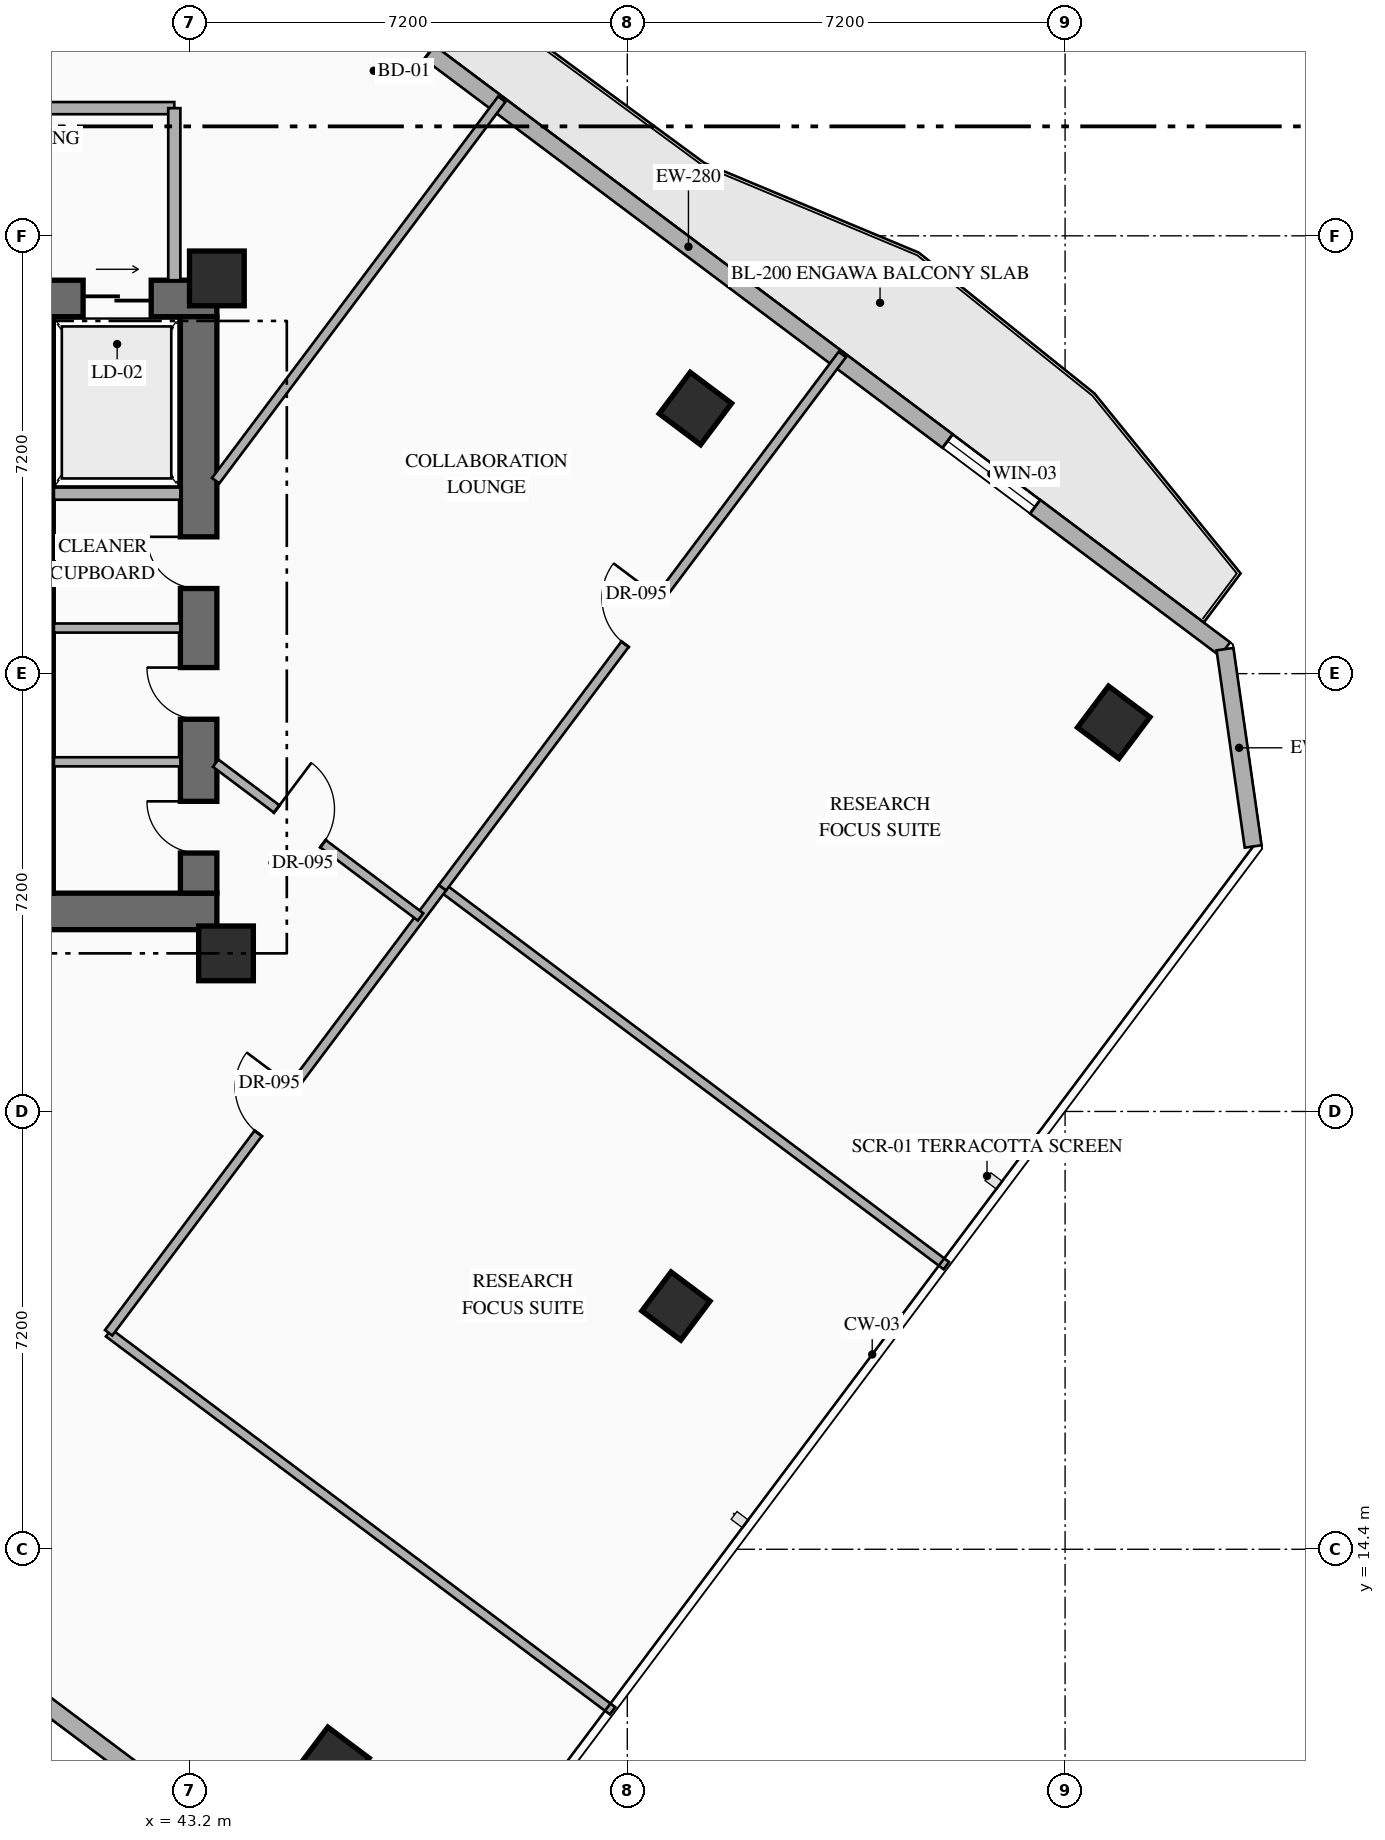
"""IFC4 building model, lengths in metres.
Left out: names, types, materials, properties, quantities, classifications, styles, units other than length and angle.
Written with IfcOpenShell. Run it as: python <this file> out.ifc"""

import sys

from ifc_helpers import new_model, si_unit, direction, frame, frame_2d, origin, origin_2d, place, context, subcontext, project, spatial, rectangle, hollow_rectangle, extrude, element, fill, save


model = new_model("IFC4")
c1 = context("Model", 3, precision=1e-05, world=origin(), true_north=direction((0.0, 1.0)))
c2 = subcontext(c1, "Body", "Model", "MODEL_VIEW")
j1 = project(units=[si_unit("LENGTHUNIT", "METRE"), si_unit("PLANEANGLEUNIT", "RADIAN")], contexts=[c1])
p1 = place(None, origin())
s1 = spatial("IfcSite", under=j1, at=p1, CompositionType="ELEMENT")
p2 = place(p1, origin())
s2 = spatial("IfcBuilding", under=s1, at=p2, CompositionType="ELEMENT")
p3 = place(p2, frame((0.0, 0.0, 138.45)))
s3 = spatial("IfcBuildingStorey", under=s2, at=p3, CompositionType="ELEMENT", Elevation=138.45)
p4 = place(p3, frame((35.89, 24.89, 0.0), z_axis=(0.0, 0.0, 1.0), x_axis=(1.0, 0.0, 0.0)))
e1 = element("IfcWall", 1, at=p4, inside=s3, PredefinedType="SHEAR", context=c2, shape_type="SweptSolid", body=[
    extrude(rectangle(XDim=7.76, YDim=0.6, at=frame_2d((3.88, 0.0))), origin(), (0.0, 0.0, 1.0), 3.6),
])
p5 = place(p3, frame((35.89, 34.97, 0.0), z_axis=(0.0, 0.0, 1.0), x_axis=(1.0, 0.0, 0.0)))
e2 = element("IfcWall", 2, at=p5, inside=s3, PredefinedType="SHEAR", context=c2, shape_type="SweptSolid", body=[
    extrude(rectangle(XDim=7.76, YDim=0.6, at=frame_2d((3.88, 0.0))), origin(), (0.0, 0.0, 1.0), 3.6),
])
p6 = place(p5, frame((2.66, 0.0, 0.0)))
e3 = element("IfcOpeningElement", 3, at=p6, cuts=e2, PredefinedType="OPENING", context=c2, shape_type="SweptSolid", body=[
    extrude(rectangle(XDim=1.1, YDim=2.2, at=frame_2d((0.55, 1.1))), frame((0.0, 0.31, 0.0), z_axis=(0.0, -1.0, 0.0), x_axis=(1.0, 0.0, 0.0)), (0.0, 0.0, 1.0), 0.62),
])
p7 = place(p5, frame((5.56, 0.0, 0.0)))
e4 = element("IfcOpeningElement", 4, at=p7, cuts=e2, PredefinedType="OPENING", context=c2, shape_type="SweptSolid", body=[
    extrude(rectangle(XDim=1.12, YDim=2.15, at=frame_2d((0.56, 1.075))), frame((0.0, 0.31, 0.0), z_axis=(0.0, -1.0, 0.0), x_axis=(1.0, 0.0, 0.0)), (0.0, 0.0, 1.0), 0.62),
])
p8 = place(p3, frame((43.35, 25.19, 0.0), z_axis=(0.0, 0.0, 1.0), x_axis=(0.0, 1.0, 0.0)))
e5 = element("IfcWall", 5, at=p8, inside=s3, PredefinedType="SHEAR", context=c2, shape_type="SweptSolid", body=[
    extrude(rectangle(XDim=9.48, YDim=0.6, at=frame_2d((4.74, 0.0))), origin(), (0.0, 0.0, 1.0), 3.6),
])
p9 = place(p8, frame((0.66, 0.0, 0.0)))
e6 = element("IfcOpeningElement", 6, at=p9, cuts=e5, PredefinedType="OPENING", context=c2, shape_type="SweptSolid", body=[
    extrude(rectangle(XDim=0.85, YDim=2.08, at=frame_2d((0.425, 1.04))), frame((0.0, 0.31, 0.0), z_axis=(0.0, -1.0, 0.0), x_axis=(1.0, 0.0, 0.0)), (0.0, 0.0, 1.0), 0.62),
])
p10 = place(p8, frame((2.86, 0.0, 0.0)))
e7 = element("IfcOpeningElement", 7, at=p10, cuts=e5, PredefinedType="OPENING", context=c2, shape_type="SweptSolid", body=[
    extrude(rectangle(XDim=0.85, YDim=2.08, at=frame_2d((0.425, 1.04))), frame((0.0, 0.31, 0.0), z_axis=(0.0, -1.0, 0.0), x_axis=(1.0, 0.0, 0.0)), (0.0, 0.0, 1.0), 0.62),
])
p11 = place(p8, frame((5.01, 0.0, 0.0)))
e8 = element("IfcOpeningElement", 8, at=p11, cuts=e5, PredefinedType="OPENING", context=c2, shape_type="SweptSolid", body=[
    extrude(rectangle(XDim=0.85, YDim=2.08, at=frame_2d((0.425, 1.04))), frame((0.0, 0.31, 0.0), z_axis=(0.0, -1.0, 0.0), x_axis=(1.0, 0.0, 0.0)), (0.0, 0.0, 1.0), 0.62),
])
p12 = place(p3, frame((40.81, 25.19, 0.0), z_axis=(0.0, 0.0, 1.0), x_axis=(0.0, 1.0, 0.0)))
e9 = element("IfcWall", 9, at=p12, inside=s3, PredefinedType="SHEAR", context=c2, shape_type="SweptSolid", body=[
    extrude(rectangle(XDim=9.48, YDim=0.3, at=frame_2d((4.74, 0.0))), origin(), (0.0, 0.0, 1.0), 3.6),
])
for number, where, z_axis, x_axis in (
    (10, (43.8, 24.2, 0.0), (0.0, 0.0, 1.0), (1.0, 0.0, 0.0)),
    (11, (43.65, 35.3, 0.0), (0.0, 0.0, 1.0), (1.0, 0.0, 0.0)),
):
    element("IfcColumn", number, at=place(p3, frame(where, z_axis=z_axis, x_axis=x_axis)), inside=s3, PredefinedType="COLUMN", context=c2, shape_type="SweptSolid", body=[
        extrude(rectangle(XDim=0.9, YDim=0.9, at=origin_2d()), origin(), (0.0, 0.0, 1.0), 3.6),
    ])
for number, where, z_axis, x_axis in (
    (12, (51.52, 33.16, 0.0), (0.0, 0.0, 1.0), (0.8, -0.6, 0.0)),
    (13, (45.56, 10.88, 0.0), (0.0, 0.0, 1.0), (0.8, -0.6, 0.0)),
    (14, (58.4, 28.0, 0.0), (0.0, 0.0, 1.0), (0.8, -0.6, 0.0)),
):
    element("IfcColumn", number, at=place(p3, frame(where, z_axis=z_axis, x_axis=x_axis)), inside=s3, PredefinedType="COLUMN", context=c2, shape_type="SweptSolid", body=[
        extrude(hollow_rectangle(XDim=0.85, YDim=0.85, WallThickness=0.032, at=origin_2d()), origin(), (0.0, 0.0, 1.0), 3.6),
    ])
p13 = place(p3, frame((51.2, 18.4, 0.0), z_axis=(0.0, 0.0, 1.0), x_axis=(0.799999996291, -0.600000004945, 0.0)))
e15 = element("IfcColumn", 15, at=p13, inside=s3, PredefinedType="COLUMN", context=c2, shape_type="SweptSolid", body=[
    extrude(hollow_rectangle(XDim=0.8, YDim=0.8, WallThickness=0.032, at=origin_2d()), origin(), (0.0, 0.0, 1.0), 3.6),
])
p14 = place(p3, frame((44.86, 40.73, 0.0), z_axis=(0.0, 0.0, 1.0), x_axis=(0.800007624502, -0.599989833863, 0.0)))
e16 = element("IfcWall", 16, at=p14, inside=s3, PredefinedType="STANDARD", context=c2, shape_type="SweptSolid", body=[
    extrude(rectangle(XDim=19.212, YDim=0.28, at=frame_2d((9.606, 0.0))), origin(), (0.0, 0.0, 1.0), 3.35),
])
p15 = place(p14, frame((1.755, 0.0, 0.0)))
e17 = element("IfcOpeningElement", 17, at=p15, cuts=e16, PredefinedType="OPENING", context=c2, shape_type="SweptSolid", body=[
    extrude(rectangle(XDim=1.1, YDim=2.2, at=frame_2d((0.55, 1.1))), frame((0.0, 0.15, 0.0), z_axis=(0.0, -1.0, 0.0), x_axis=(1.0, 0.0, 0.0)), (0.0, 0.0, 1.0), 0.3),
])
p16 = place(p14, frame((13.509, 0.0, 0.85)))
e18 = element("IfcOpeningElement", 18, at=p16, cuts=e16, PredefinedType="OPENING", context=c2, shape_type="SweptSolid", body=[
    extrude(rectangle(XDim=1.8, YDim=2.1, at=frame_2d((0.9, 1.05))), frame((0.0, 0.15, 0.0), z_axis=(0.0, -1.0, 0.0), x_axis=(1.0, 0.0, 0.0)), (0.0, 0.0, 1.0), 0.3),
])
p17 = place(p3, frame((60.23, 29.203, 0.0), z_axis=(0.0, 0.0, 1.0), x_axis=(0.141296221922, -0.989967361922, 0.0)))
e19 = element("IfcWall", 19, at=p17, inside=s3, PredefinedType="STANDARD", context=c2, shape_type="SweptSolid", body=[
    extrude(rectangle(XDim=3.278, YDim=0.28, at=frame_2d((1.639, 0.0))), origin(), (0.0, 0.0, 1.0), 3.35),
])
p18 = place(p3, frame((44.918, 8.787, 0.0), z_axis=(0.0, 0.0, 1.0), x_axis=(-0.800004765927, 0.599993645378, 0.0)))
e20 = element("IfcWall", 20, at=p18, inside=s3, PredefinedType="STANDARD", context=c2, shape_type="SweptSolid", body=[
    extrude(rectangle(XDim=24.588, YDim=0.28, at=frame_2d((12.294, 0.0))), origin(), (0.0, 0.0, 1.0), 3.35),
])
p19 = place(p3, frame((40.97, 31.76, 0.0), z_axis=(0.0, 0.0, 1.0), x_axis=(1.0, 0.0, 0.0)))
e21 = element("IfcWall", 21, at=p19, inside=s3, PredefinedType="STANDARD", context=c2, shape_type="SweptSolid", body=[
    extrude(rectangle(XDim=2.08, YDim=0.2, at=frame_2d((1.04, 0.0))), origin(), (0.0, 0.0, 1.0), 3.35),
])
for number, where, z_axis, x_axis in (
    (22, (40.97, 27.35, 0.0), (0.0, 0.0, 1.0), (1.0, 0.0, 0.0)),
    (23, (40.97, 29.55, 0.0), (0.0, 0.0, 1.0), (1.0, 0.0, 0.0)),
):
    element("IfcWall", number, at=place(p3, frame(where, z_axis=z_axis, x_axis=x_axis)), inside=s3, PredefinedType="PARTITIONING", context=c2, shape_type="SweptSolid", body=[
        extrude(rectangle(XDim=2.08, YDim=0.15, at=frame_2d((1.04, 0.0))), origin(), (0.0, 0.0, 1.0), 3.35),
    ])
p20 = place(p3, frame((37.65, 38.1, 0.0), z_axis=(0.0, 0.0, 1.0), x_axis=(1.0, 0.0, 0.0)))
e24 = element("IfcWall", 24, at=p20, inside=s3, PredefinedType="STANDARD", context=c2, shape_type="SweptSolid", body=[
    extrude(rectangle(XDim=5.3, YDim=0.2, at=frame_2d((2.65, 0.0))), origin(), (0.0, 0.0, 1.0), 3.35),
])
p21 = place(p3, frame((42.95, 35.27, 0.0), z_axis=(0.0, 0.0, 1.0), x_axis=(0.0, 1.0, 0.0)))
e25 = element("IfcWall", 25, at=p21, inside=s3, PredefinedType="STANDARD", context=c2, shape_type="SweptSolid", body=[
    extrude(rectangle(XDim=2.83, YDim=0.2, at=frame_2d((1.415, 0.0))), origin(), (0.0, 0.0, 1.0), 3.35),
])
for number, where, z_axis, x_axis in (
    (26, (41.87, 17.96, 0.0), (0.0, 0.0, 1.0), (0.8, -0.6, 0.0)),
    (27, (47.36, 25.28, 0.0), (0.0, 0.0, 1.0), (0.8, -0.6, 0.0)),
):
    element("IfcWall", number, at=place(p3, frame(where, z_axis=z_axis, x_axis=x_axis)), inside=s3, PredefinedType="PARTITIONING", context=c2, shape_type="SweptSolid", body=[
        extrude(rectangle(XDim=10.36, YDim=0.15, at=frame_2d((5.18, 0.0))), origin(), (0.0, 0.0, 1.0), 3.35),
    ])
p22 = place(p3, frame((41.87, 17.96, 0.0), z_axis=(0.0, 0.0, 1.0), x_axis=(0.599995730889, 0.800003201816, 0.0)))
e28 = element("IfcWall", 28, at=p22, inside=s3, PredefinedType="PARTITIONING", context=c2, shape_type="SweptSolid", body=[
    extrude(rectangle(XDim=9.15, YDim=0.15, at=frame_2d((4.575, 0.0))), origin(), (0.0, 0.0, 1.0), 3.35),
])
p23 = place(p22, frame((4.1, 0.0, 0.0)))
e29 = element("IfcOpeningElement", 29, at=p23, cuts=e28, PredefinedType="OPENING", context=c2, shape_type="SweptSolid", body=[
    extrude(rectangle(XDim=0.95, YDim=2.15, at=frame_2d((0.475, 1.075))), frame((0.0, 0.085, 0.0), z_axis=(0.0, -1.0, 0.0), x_axis=(1.0, 0.0, 0.0)), (0.0, 0.0, 1.0), 0.17),
])
p24 = place(p3, frame((47.36, 25.28, 0.0), z_axis=(0.0, 0.0, 1.0), x_axis=(0.599992871789, 0.800005346109, 0.0)))
e30 = element("IfcWall", 30, at=p24, inside=s3, PredefinedType="PARTITIONING", context=c2, shape_type="SweptSolid", body=[
    extrude(rectangle(XDim=10.96, YDim=0.15, at=frame_2d((5.48, 0.0))), origin(), (0.0, 0.0, 1.0), 3.35),
])
p25 = place(p24, frame((5.005, 0.0, 0.0)))
e31 = element("IfcOpeningElement", 31, at=p25, cuts=e30, PredefinedType="OPENING", context=c2, shape_type="SweptSolid", body=[
    extrude(rectangle(XDim=0.95, YDim=2.15, at=frame_2d((0.475, 1.075))), frame((0.0, 0.085, 0.0), z_axis=(0.0, -1.0, 0.0), x_axis=(1.0, 0.0, 0.0)), (0.0, 0.0, 1.0), 0.17),
])
p26 = place(p3, frame((43.63, 27.328, 0.0), z_axis=(0.0, 0.0, 1.0), x_axis=(0.799972182084, -0.600037088764, 0.0)))
e32 = element("IfcWall", 32, at=p26, inside=s3, PredefinedType="PARTITIONING", context=c2, shape_type="SweptSolid", body=[
    extrude(rectangle(XDim=4.213, YDim=0.15, at=frame_2d((2.106, 0.0))), origin(), (0.0, 0.0, 1.0), 3.045),
])
p27 = place(p26, frame((1.256, 0.0, 0.0)))
e33 = element("IfcOpeningElement", 33, at=p27, cuts=e32, PredefinedType="OPENING", context=c2, shape_type="SweptSolid", body=[
    extrude(rectangle(XDim=0.95, YDim=2.15, at=frame_2d((0.475, 1.075))), frame((0.0, 0.085, 0.0), z_axis=(0.0, -1.0, 0.0), x_axis=(1.0, 0.0, 0.0)), (0.0, 0.0, 1.0), 0.17),
])
p28 = place(p3, frame((43.63, 31.973, 0.0), z_axis=(0.0, 0.0, 1.0), x_axis=(0.599975099311, 0.800018674911, 0.0)))
e34 = element("IfcWall", 34, at=p28, inside=s3, PredefinedType="PARTITIONING", context=c2, shape_type="SweptSolid", body=[
    extrude(rectangle(XDim=7.844, YDim=0.15, at=frame_2d((3.922, 0.0))), origin(), (0.0, 0.0, 1.0), 3.35),
])
p29 = place(p15, origin())
e35 = element("IfcDoor", 35, at=p29, inside=s3, OperationType="SINGLE_SWING_LEFT", PredefinedType="DOOR", context=c2, shape_type="SweptSolid", body=[
    extrude(rectangle(XDim=1.1, YDim=2.2, at=frame_2d((0.55, 1.1))), frame((0.0, 0.025, 0.0), z_axis=(0.0, -1.0, 0.0), x_axis=(1.0, 0.0, 0.0)), (0.0, 0.0, 1.0), 0.05),
])
fill(e17, e35)
p30 = place(p16, origin())
e36 = element("IfcWindow", 36, at=p30, inside=s3, PartitioningType="SINGLE_PANEL", PredefinedType="WINDOW", context=c2, shape_type="SweptSolid", body=[
    extrude(rectangle(XDim=1.8, YDim=2.1, at=frame_2d((0.9, 1.05))), frame((0.0, 0.03, 0.0), z_axis=(0.0, -1.0, 0.0), x_axis=(1.0, 0.0, 0.0)), (0.0, 0.0, 1.0), 0.06),
])
fill(e18, e36)
p31 = place(p7, origin())
e37 = element("IfcDoor", 37, at=p31, inside=s3, OperationType="SLIDING_TO_RIGHT", PredefinedType="USERDEFINED", context=c2, shape_type="SweptSolid", body=[
    extrude(rectangle(XDim=1.12, YDim=2.15, at=frame_2d((0.56, 1.075))), frame((0.0, 0.025, 0.0), z_axis=(0.0, -1.0, 0.0), x_axis=(1.0, 0.0, 0.0)), (0.0, 0.0, 1.0), 0.05),
])
fill(e4, e37)
p32 = place(p9, origin())
e38 = element("IfcDoor", 38, at=p32, inside=s3, OperationType="SINGLE_SWING_RIGHT", PredefinedType="DOOR", context=c2, shape_type="SweptSolid", body=[
    extrude(rectangle(XDim=0.85, YDim=2.08, at=frame_2d((0.425, 1.04))), frame((0.0, 0.025, 0.0), z_axis=(0.0, -1.0, 0.0), x_axis=(1.0, 0.0, 0.0)), (0.0, 0.0, 1.0), 0.05),
])
fill(e6, e38)
p33 = place(p10, origin())
e39 = element("IfcDoor", 39, at=p33, inside=s3, OperationType="SINGLE_SWING_RIGHT", PredefinedType="DOOR", context=c2, shape_type="SweptSolid", body=[
    extrude(rectangle(XDim=0.85, YDim=2.08, at=frame_2d((0.425, 1.04))), frame((0.0, 0.025, 0.0), z_axis=(0.0, -1.0, 0.0), x_axis=(1.0, 0.0, 0.0)), (0.0, 0.0, 1.0), 0.05),
])
fill(e7, e39)
p34 = place(p11, origin())
e40 = element("IfcDoor", 40, at=p34, inside=s3, OperationType="SINGLE_SWING_RIGHT", PredefinedType="DOOR", context=c2, shape_type="SweptSolid", body=[
    extrude(rectangle(XDim=0.85, YDim=2.08, at=frame_2d((0.425, 1.04))), frame((0.0, 0.025, 0.0), z_axis=(0.0, -1.0, 0.0), x_axis=(1.0, 0.0, 0.0)), (0.0, 0.0, 1.0), 0.05),
])
fill(e8, e40)
p35 = place(p23, origin())
e41 = element("IfcDoor", 41, at=p35, inside=s3, OperationType="SINGLE_SWING_RIGHT", PredefinedType="DOOR", context=c2, shape_type="SweptSolid", body=[
    extrude(rectangle(XDim=0.95, YDim=2.15, at=frame_2d((0.475, 1.075))), frame((0.0, 0.025, 0.0), z_axis=(0.0, -1.0, 0.0), x_axis=(1.0, 0.0, 0.0)), (0.0, 0.0, 1.0), 0.05),
])
fill(e29, e41)
p36 = place(p25, origin())
e42 = element("IfcDoor", 42, at=p36, inside=s3, OperationType="SINGLE_SWING_RIGHT", PredefinedType="DOOR", context=c2, shape_type="SweptSolid", body=[
    extrude(rectangle(XDim=0.95, YDim=2.15, at=frame_2d((0.475, 1.075))), frame((0.0, 0.025, 0.0), z_axis=(0.0, -1.0, 0.0), x_axis=(1.0, 0.0, 0.0)), (0.0, 0.0, 1.0), 0.05),
])
fill(e31, e42)
p37 = place(p27, origin())
e43 = element("IfcDoor", 43, at=p37, inside=s3, OperationType="SINGLE_SWING_LEFT", PredefinedType="DOOR", context=c2, shape_type="SweptSolid", body=[
    extrude(rectangle(XDim=0.95, YDim=2.15, at=frame_2d((0.475, 1.075))), frame((0.0, 0.025, 0.0), z_axis=(0.0, -1.0, 0.0), x_axis=(1.0, 0.0, 0.0)), (0.0, 0.0, 1.0), 0.05),
])
fill(e33, e43)
save(model, sys.argv[1])
